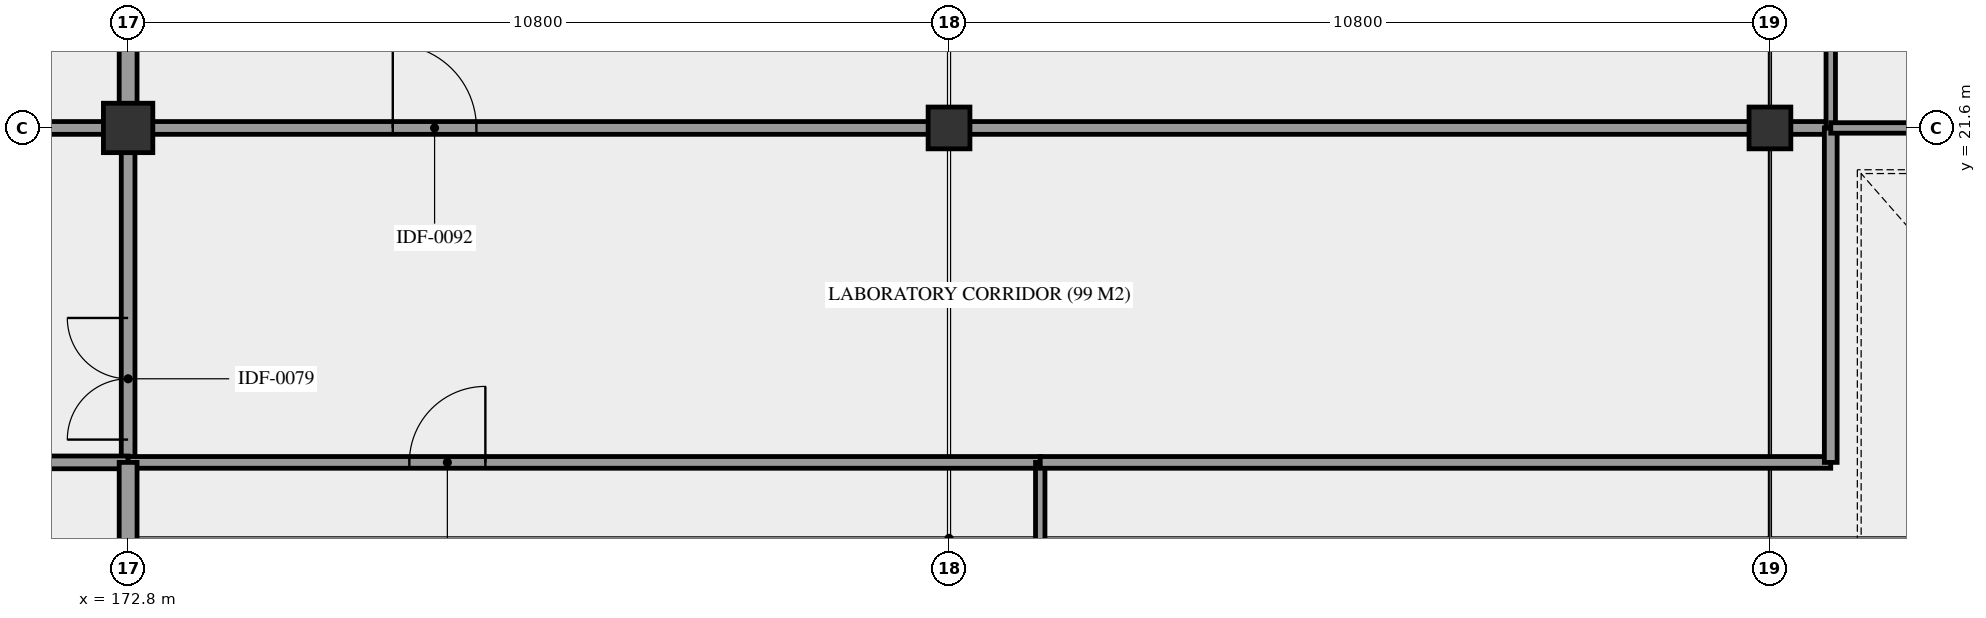
"""IFC4 building model, lengths in metres.
Left out: names, types, materials, properties, quantities, classifications, styles, units other than length and angle.
Written with IfcOpenShell. Run it as: python <this file> out.ifc"""

import sys

from ifc_helpers import new_model, si_unit, direction, frame, frame_2d, origin, origin_2d, place, context, subcontext, project, spatial, rectangle, extrude, element, fill, save


model = new_model("IFC4")
c1 = context("Model", 3, precision=1e-05, world=origin(), true_north=direction((0.0, 1.0)))
c2 = subcontext(c1, "Body", "Model", "MODEL_VIEW")
j1 = project(units=[si_unit("LENGTHUNIT", "METRE"), si_unit("PLANEANGLEUNIT", "RADIAN")], contexts=[c1])
p1 = place(None, origin())
s1 = spatial("IfcSite", under=j1, at=p1, CompositionType="ELEMENT")
p2 = place(p1, origin())
s2 = spatial("IfcBuilding", under=s1, at=p2, CompositionType="ELEMENT")
p3 = place(p2, frame((0.0, 0.0, 10.08)))
s3 = spatial("IfcBuildingStorey", under=s2, at=p3, CompositionType="ELEMENT", Elevation=10.08)
p4 = place(p3, frame((172.8, 21.6, 0.0), z_axis=(0.0, 0.0, 1.0), x_axis=(1.0, 0.0, 0.0)))
e1 = element("IfcColumn", 1, at=p4, inside=s3, PredefinedType="COLUMN", context=c2, shape_type="SweptSolid", body=[
    extrude(rectangle(XDim=0.65, YDim=0.65, at=origin_2d()), origin(), (0.0, 0.0, 1.0), 4.68),
])
for number, where, z_axis, x_axis in (
    (2, (183.6, 21.6, 0.0), (0.0, 0.0, 1.0), (1.0, 0.0, 0.0)),
    (3, (194.4, 21.6, 0.0), (0.0, 0.0, 1.0), (1.0, 0.0, 0.0)),
):
    element("IfcColumn", number, at=place(p3, frame(where, z_axis=z_axis, x_axis=x_axis)), inside=s3, PredefinedType="COLUMN", context=c2, shape_type="SweptSolid", body=[
        extrude(rectangle(XDim=0.55, YDim=0.55, at=origin_2d()), origin(), (0.0, 0.0, 1.0), 4.68),
    ])
p5 = place(p3, frame((172.8, 17.2, 0.0), z_axis=(0.0, 0.0, 1.0), x_axis=(0.0, 1.0, 0.0)))
e4 = element("IfcWall", 4, at=p5, inside=s3, PredefinedType="PARTITIONING", context=c2, shape_type="SweptSolid", body=[
    extrude(rectangle(XDim=4.4, YDim=0.18, at=frame_2d((2.2, 0.0))), origin(), (0.0, 0.0, 1.0), 3.23),
])
p6 = place(p5, frame((0.3, 0.0, 0.0)))
e5 = element("IfcOpeningElement", 5, at=p6, cuts=e4, PredefinedType="OPENING", context=c2, shape_type="SweptSolid", body=[
    extrude(rectangle(XDim=1.6, YDim=2.2, at=frame_2d((0.8, 1.1))), frame((0.0, 0.1, 0.0), z_axis=(0.0, -1.0, 0.0), x_axis=(1.0, 0.0, 0.0)), (0.0, 0.0, 1.0), 0.2),
])
p7 = place(p3, frame((162.0, 21.6, 0.0), z_axis=(0.0, 0.0, 1.0), x_axis=(1.0, 0.0, 0.0)))
e6 = element("IfcWall", 6, at=p7, inside=s3, PredefinedType="PARTITIONING", context=c2, shape_type="SweptSolid", body=[
    extrude(rectangle(XDim=10.8, YDim=0.168, at=frame_2d((5.4, 0.0))), origin(), (0.0, 0.0, 1.0), 3.23),
])
p8 = place(p7, frame((2.15, 0.0, 0.0)))
e7 = element("IfcOpeningElement", 7, at=p8, cuts=e6, PredefinedType="OPENING", context=c2, shape_type="SweptSolid", body=[
    extrude(rectangle(XDim=1.1, YDim=2.2, at=frame_2d((0.55, 1.1))), frame((0.0, 0.094, 0.0), z_axis=(0.0, -1.0, 0.0), x_axis=(1.0, 0.0, 0.0)), (0.0, 0.0, 1.0), 0.188),
])
p9 = place(p3, frame((167.4, 17.2, 0.0), z_axis=(0.0, 0.0, 1.0), x_axis=(1.0, 0.0, 0.0)))
e8 = element("IfcWall", 8, at=p9, inside=s3, PredefinedType="PARTITIONING", context=c2, shape_type="SweptSolid", body=[
    extrude(rectangle(XDim=5.4, YDim=0.168, at=frame_2d((2.7, 0.0))), origin(), (0.0, 0.0, 1.0), 3.23),
])
p10 = place(p9, frame((0.422, 0.0, 0.0)))
e9 = element("IfcOpeningElement", 9, at=p10, cuts=e8, PredefinedType="OPENING", context=c2, shape_type="SweptSolid", body=[
    extrude(rectangle(XDim=1.1, YDim=2.2, at=frame_2d((0.55, 1.1))), frame((0.0, 0.094, 0.0), z_axis=(0.0, -1.0, 0.0), x_axis=(1.0, 0.0, 0.0)), (0.0, 0.0, 1.0), 0.188),
])
p11 = place(p3, frame((172.8, 17.2, 0.0), z_axis=(0.0, 0.0, 1.0), x_axis=(1.0, 0.0, 0.0)))
e10 = element("IfcWall", 10, at=p11, inside=s3, PredefinedType="PARTITIONING", context=c2, shape_type="SweptSolid", body=[
    extrude(rectangle(XDim=12.0, YDim=0.154, at=frame_2d((6.0, 0.0))), origin(), (0.0, 0.0, 1.0), 3.23),
])
p12 = place(p11, frame((3.7, 0.0, 0.0)))
e11 = element("IfcOpeningElement", 11, at=p12, cuts=e10, PredefinedType="OPENING", context=c2, shape_type="SweptSolid", body=[
    extrude(rectangle(XDim=1.0, YDim=2.15, at=frame_2d((0.5, 1.075))), frame((0.0, 0.087, 0.0), z_axis=(0.0, -1.0, 0.0), x_axis=(1.0, 0.0, 0.0)), (0.0, 0.0, 1.0), 0.174),
])
p13 = place(p3, frame((172.8, 21.6, 0.0), z_axis=(0.0, 0.0, 1.0), x_axis=(1.0, 0.0, 0.0)))
e12 = element("IfcWall", 12, at=p13, inside=s3, PredefinedType="PARTITIONING", context=c2, shape_type="SweptSolid", body=[
    extrude(rectangle(XDim=22.4, YDim=0.168, at=frame_2d((11.2, 0.0))), origin(), (0.0, 0.0, 1.0), 3.23),
])
p14 = place(p13, frame((3.482, 0.0, 0.0)))
e13 = element("IfcOpeningElement", 13, at=p14, cuts=e12, PredefinedType="OPENING", context=c2, shape_type="SweptSolid", body=[
    extrude(rectangle(XDim=1.1, YDim=2.2, at=frame_2d((0.55, 1.1))), frame((0.0, 0.094, 0.0), z_axis=(0.0, -1.0, 0.0), x_axis=(1.0, 0.0, 0.0)), (0.0, 0.0, 1.0), 0.188),
])
p15 = place(p3, frame((172.8, 5.4, 0.0), z_axis=(0.0, 0.0, 1.0), x_axis=(0.0, 1.0, 0.0)))
e14 = element("IfcWall", 14, at=p15, inside=s3, PredefinedType="PARTITIONING", context=c2, shape_type="SweptSolid", body=[
    extrude(rectangle(XDim=11.8, YDim=0.235, at=frame_2d((5.9, 0.0))), origin(), (0.0, 0.0, 1.0), 3.23),
])
p16 = place(p3, frame((172.8, 21.6, 0.0), z_axis=(0.0, 0.0, 1.0), x_axis=(0.0, 1.0, 0.0)))
e15 = element("IfcWall", 15, at=p16, inside=s3, PredefinedType="PARTITIONING", context=c2, shape_type="SweptSolid", body=[
    extrude(rectangle(XDim=10.8, YDim=0.235, at=frame_2d((5.4, 0.0))), origin(), (0.0, 0.0, 1.0), 3.23),
])
p17 = place(p3, frame((184.8, 11.2, 0.0), z_axis=(0.0, 0.0, 1.0), x_axis=(0.0, 1.0, 0.0)))
e16 = element("IfcWall", 16, at=p17, inside=s3, PredefinedType="PARTITIONING", context=c2, shape_type="SweptSolid", body=[
    extrude(rectangle(XDim=6.0, YDim=0.124, at=frame_2d((3.0, 0.0))), origin(), (0.0, 0.0, 1.0), 3.23),
])
p18 = place(p3, frame((184.8, 17.2, 0.0), z_axis=(0.0, 0.0, 1.0), x_axis=(1.0, 0.0, 0.0)))
e17 = element("IfcWall", 17, at=p18, inside=s3, PredefinedType="PARTITIONING", context=c2, shape_type="SweptSolid", body=[
    extrude(rectangle(XDim=10.4, YDim=0.154, at=frame_2d((5.2, 0.0))), origin(), (0.0, 0.0, 1.0), 3.23),
])
p19 = place(p3, frame((195.2, 17.2, 0.0), z_axis=(0.0, 0.0, 1.0), x_axis=(0.0, 1.0, 0.0)))
e18 = element("IfcWall", 18, at=p19, inside=s3, PredefinedType="PARTITIONING", context=c2, shape_type="SweptSolid", body=[
    extrude(rectangle(XDim=4.4, YDim=0.168, at=frame_2d((2.2, 0.0))), origin(), (0.0, 0.0, 1.0), 3.23),
])
p20 = place(p3, frame((195.2, 21.6, 0.0), z_axis=(0.0, 0.0, 1.0), x_axis=(0.0, 1.0, 0.0)))
e19 = element("IfcWall", 19, at=p20, inside=s3, PredefinedType="PARTITIONING", context=c2, shape_type="SweptSolid", body=[
    extrude(rectangle(XDim=10.8, YDim=0.124, at=frame_2d((5.4, 0.0))), origin(), (0.0, 0.0, 1.0), 3.23),
])
p21 = place(p3, frame((195.2, 21.6, 0.0), z_axis=(0.0, 0.0, 1.0), x_axis=(1.0, 0.0, 0.0)))
e20 = element("IfcWall", 20, at=p21, inside=s3, PredefinedType="PARTITIONING", context=c2, shape_type="SweptSolid", body=[
    extrude(rectangle(XDim=9.2, YDim=0.138, at=frame_2d((4.6, 0.0))), origin(), (0.0, 0.0, 1.0), 3.23),
])
p22 = place(p6, origin())
e21 = element("IfcDoor", 21, at=p22, inside=s3, OperationType="DOUBLE_DOOR_SINGLE_SWING", PredefinedType="DOOR", context=c2, shape_type="SweptSolid", body=[
    extrude(rectangle(XDim=1.6, YDim=2.2, at=frame_2d((0.8, 1.1))), frame((0.0, 0.025, 0.0), z_axis=(0.0, -1.0, 0.0), x_axis=(1.0, 0.0, 0.0)), (0.0, 0.0, 1.0), 0.05),
])
fill(e5, e21)
p23 = place(p12, origin())
e22 = element("IfcDoor", 22, at=p23, inside=s3, OperationType="SINGLE_SWING_RIGHT", PredefinedType="DOOR", context=c2, shape_type="SweptSolid", body=[
    extrude(rectangle(XDim=1.0, YDim=2.15, at=frame_2d((0.5, 1.075))), frame((0.0, 0.025, 0.0), z_axis=(0.0, -1.0, 0.0), x_axis=(1.0, 0.0, 0.0)), (0.0, 0.0, 1.0), 0.05),
])
fill(e11, e22)
p24 = place(p14, origin())
e23 = element("IfcDoor", 23, at=p24, inside=s3, OperationType="SINGLE_SWING_LEFT", PredefinedType="DOOR", context=c2, shape_type="SweptSolid", body=[
    extrude(rectangle(XDim=1.1, YDim=2.2, at=frame_2d((0.55, 1.1))), frame((0.0, 0.025, 0.0), z_axis=(0.0, -1.0, 0.0), x_axis=(1.0, 0.0, 0.0)), (0.0, 0.0, 1.0), 0.05),
])
fill(e13, e23)
save(model, sys.argv[1])
